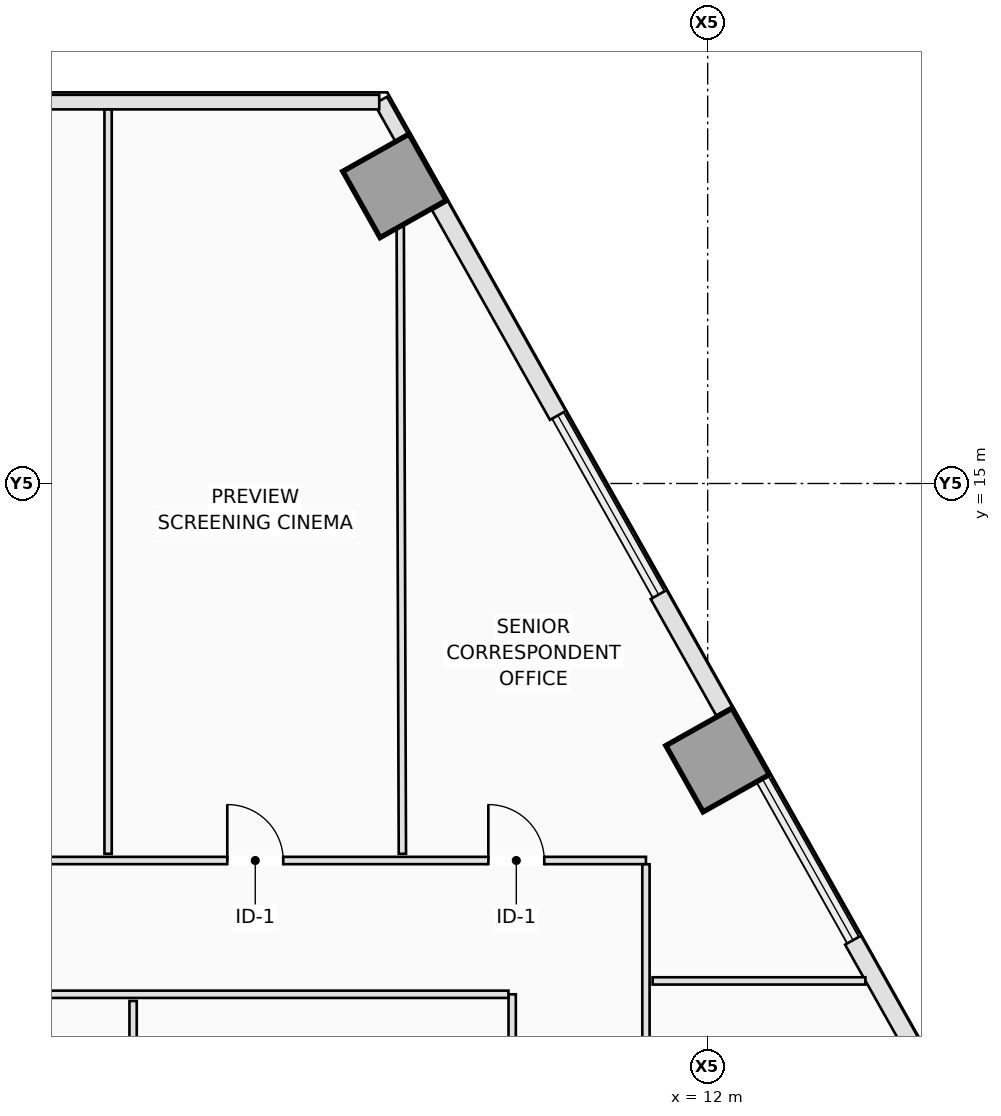
"""IFC4 building model, lengths in metres.
Left out: names, types, materials, properties, quantities, classifications, styles, units other than length and angle.
Written with IfcOpenShell. Run it as: python <this file> out.ifc"""

import sys

from ifc_helpers import new_model, si_unit, direction, frame, frame_2d, origin, origin_2d, place, context, subcontext, project, spatial, rectangle, extrude, element, fill, save


model = new_model("IFC4")
c1 = context("Model", 3, precision=1e-05, world=origin(), true_north=direction((0.0, 1.0)))
c2 = subcontext(c1, "Body", "Model", "MODEL_VIEW")
j1 = project(units=[si_unit("LENGTHUNIT", "METRE"), si_unit("PLANEANGLEUNIT", "RADIAN")], contexts=[c1])
p1 = place(None, origin())
s1 = spatial("IfcSite", under=j1, at=p1, CompositionType="ELEMENT")
p2 = place(p1, origin())
s2 = spatial("IfcBuilding", under=s1, at=p2, CompositionType="ELEMENT")
p3 = place(p2, frame((0.0, 0.0, 52.1)))
s3 = spatial("IfcBuildingStorey", under=s2, at=p3, CompositionType="ELEMENT", Elevation=52.1)
for number, where, z_axis, x_axis in (
    (1, (12.163, 10.451, 0.0), (0.0, 0.0, 1.0), (0.872, 0.49, 0.0)),
    (2, (6.851, 19.895, 0.0), (0.0, 0.0, 1.0), (0.872, 0.49, 0.0)),
):
    element("IfcColumn", number, at=place(p3, frame(where, z_axis=z_axis, x_axis=x_axis)), inside=s3, PredefinedType="COLUMN", context=c2, shape_type="SweptSolid", body=[
        extrude(rectangle(XDim=1.25, YDim=1.25, at=origin_2d()), origin(), (0.0, 0.0, 1.0), 3.5),
    ])
p4 = place(p3, frame((6.622, 21.301, 0.0), z_axis=(0.0, 0.0, 1.0), x_axis=(0.490261239633, -0.871575537125, 0.0)))
e3 = element("IfcWall", 3, at=p4, inside=s3, PredefinedType="STANDARD", context=c2, shape_type="SweptSolid", body=[
    extrude(rectangle(XDim=0.708, YDim=0.24, at=frame_2d((0.354, 0.0))), origin(), (0.0, 0.0, 1.0), 3.25),
])
p5 = place(p3, frame((7.597, 19.569, 0.0), z_axis=(0.0, 0.0, 1.0), x_axis=(0.490240735008, -0.871587070659, 0.0)))
e4 = element("IfcWall", 4, at=p5, inside=s3, PredefinedType="STANDARD", context=c2, shape_type="SweptSolid", body=[
    extrude(rectangle(XDim=3.957, YDim=0.3, at=frame_2d((1.979, 0.0))), origin(), (0.0, 0.0, 1.0), 3.25),
])
p6 = place(p3, frame((11.194, 13.173, 0.0), z_axis=(0.0, 0.0, 1.0), x_axis=(0.490324540864, -0.871539927156, 0.0)))
e5 = element("IfcWall", 5, at=p6, inside=s3, PredefinedType="STANDARD", context=c2, shape_type="SweptSolid", body=[
    extrude(rectangle(XDim=2.197, YDim=0.3, at=frame_2d((1.099, 0.0))), origin(), (0.0, 0.0, 1.0), 3.25),
])
p7 = place(p3, frame((14.391, 7.49, 0.0), z_axis=(0.0, 0.0, 1.0), x_axis=(0.490290775148, -0.871558922738, 0.0)))
e6 = element("IfcWall", 6, at=p7, inside=s3, PredefinedType="STANDARD", context=c2, shape_type="SweptSolid", body=[
    extrude(rectangle(XDim=3.14, YDim=0.3, at=frame_2d((1.57, 0.0))), origin(), (0.0, 0.0, 1.0), 3.25),
])
p8 = place(p3, frame((6.598, 21.272, 0.0), z_axis=(0.0, 0.0, 1.0), x_axis=(-1.0, 0.0, 0.0)))
e7 = element("IfcWall", 7, at=p8, inside=s3, PredefinedType="STANDARD", context=c2, shape_type="SweptSolid", body=[
    extrude(rectangle(XDim=13.187, YDim=0.24, at=frame_2d((6.593, 0.0))), origin(), (0.0, 0.0, 1.0), 3.25),
])
p9 = place(p8, frame((5.693, 0.0, 0.9)))
e8 = element("IfcOpeningElement", 8, at=p9, cuts=e7, PredefinedType="OPENING", context=c2, shape_type="SweptSolid", body=[
    extrude(rectangle(XDim=1.8, YDim=2.1, at=frame_2d((0.9, 1.05))), frame((0.0, 0.13, 0.0), z_axis=(0.0, -1.0, 0.0), x_axis=(1.0, 0.0, 0.0)), (0.0, 0.0, 1.0), 0.26),
])
p10 = place(p3, frame((-10.653, 8.8, 0.0), z_axis=(0.0, 0.0, 1.0), x_axis=(1.0, 0.0, 0.0)))
e9 = element("IfcWall", 9, at=p10, inside=s3, PredefinedType="PARTITIONING", context=c2, shape_type="SweptSolid", body=[
    extrude(rectangle(XDim=21.638, YDim=0.12, at=frame_2d((10.819, 0.0))), origin(), (0.0, 0.0, 1.0), 3.25),
])
p11 = place(p10, frame((14.753, 0.0, 0.0)))
e10 = element("IfcOpeningElement", 10, at=p11, cuts=e9, PredefinedType="OPENING", context=c2, shape_type="SweptSolid", body=[
    extrude(rectangle(XDim=0.92, YDim=2.12, at=frame_2d((0.46, 1.06))), frame((0.0, 0.07, 0.0), z_axis=(0.0, -1.0, 0.0), x_axis=(1.0, 0.0, 0.0)), (0.0, 0.0, 1.0), 0.14),
])
p12 = place(p10, frame((7.253, 0.0, 0.0)))
e11 = element("IfcOpeningElement", 11, at=p12, cuts=e9, PredefinedType="OPENING", context=c2, shape_type="SweptSolid", body=[
    extrude(rectangle(XDim=0.92, YDim=2.12, at=frame_2d((0.46, 1.06))), frame((0.0, 0.07, 0.0), z_axis=(0.0, -1.0, 0.0), x_axis=(1.0, 0.0, 0.0)), (0.0, 0.0, 1.0), 0.14),
])
p13 = place(p10, frame((19.046, 0.0, 0.0)))
e12 = element("IfcOpeningElement", 12, at=p13, cuts=e9, PredefinedType="OPENING", context=c2, shape_type="SweptSolid", body=[
    extrude(rectangle(XDim=0.92, YDim=2.12, at=frame_2d((0.46, 1.06))), frame((0.0, 0.07, 0.0), z_axis=(0.0, -1.0, 0.0), x_axis=(1.0, 0.0, 0.0)), (0.0, 0.0, 1.0), 0.14),
])
p14 = place(p3, frame((10.985, 8.738, 0.0), z_axis=(0.0, 0.0, 1.0), x_axis=(0.0, -1.0, 0.0)))
e13 = element("IfcWall", 13, at=p14, inside=s3, PredefinedType="PARTITIONING", context=c2, shape_type="SweptSolid", body=[
    extrude(rectangle(XDim=11.138, YDim=0.12, at=frame_2d((5.569, 0.0))), origin(), (0.0, 0.0, 1.0), 3.25),
])
p15 = place(p14, frame((3.838, 0.0, 0.0)))
e14 = element("IfcOpeningElement", 14, at=p15, cuts=e13, PredefinedType="OPENING", context=c2, shape_type="SweptSolid", body=[
    extrude(rectangle(XDim=0.92, YDim=2.12, at=frame_2d((0.46, 1.06))), frame((0.0, 0.07, 0.0), z_axis=(0.0, -1.0, 0.0), x_axis=(1.0, 0.0, 0.0)), (0.0, 0.0, 1.0), 0.14),
])
p16 = place(p3, frame((8.785, -2.338, 0.0), z_axis=(0.0, 0.0, 1.0), x_axis=(0.0, 1.0, 0.0)))
e15 = element("IfcWall", 15, at=p16, inside=s3, PredefinedType="PARTITIONING", context=c2, shape_type="SweptSolid", body=[
    extrude(rectangle(XDim=8.938, YDim=0.12, at=frame_2d((4.469, 0.0))), origin(), (0.0, 0.0, 1.0), 3.25),
])
p17 = place(p16, frame((3.978, 0.0, 0.0)))
e16 = element("IfcOpeningElement", 16, at=p17, cuts=e15, PredefinedType="OPENING", context=c2, shape_type="SweptSolid", body=[
    extrude(rectangle(XDim=0.92, YDim=2.12, at=frame_2d((0.46, 1.06))), frame((0.0, 0.07, 0.0), z_axis=(0.0, -1.0, 0.0), x_axis=(1.0, 0.0, 0.0)), (0.0, 0.0, 1.0), 0.14),
])
p18 = place(p3, frame((8.723, 6.6, 0.0), z_axis=(0.0, 0.0, 1.0), x_axis=(-1.0, 0.0, 0.0)))
e17 = element("IfcWall", 17, at=p18, inside=s3, PredefinedType="PARTITIONING", context=c2, shape_type="SweptSolid", body=[
    extrude(rectangle(XDim=17.238, YDim=0.12, at=frame_2d((8.619, 0.0))), origin(), (0.0, 0.0, 1.0), 3.25),
])
p19 = place(p18, frame((11.116, 0.0, 0.0)))
e18 = element("IfcOpeningElement", 18, at=p19, cuts=e17, PredefinedType="OPENING", context=c2, shape_type="SweptSolid", body=[
    extrude(rectangle(XDim=0.92, YDim=2.12, at=frame_2d((0.46, 1.06))), frame((0.0, 0.07, 0.0), z_axis=(0.0, -1.0, 0.0), x_axis=(1.0, 0.0, 0.0)), (0.0, 0.0, 1.0), 0.14),
])
p20 = place(p3, frame((2.14, 8.91, 0.0), z_axis=(0.0, 0.0, 1.0), x_axis=(0.0, 1.0, 0.0)))
e19 = element("IfcWall", 19, at=p20, inside=s3, PredefinedType="PARTITIONING", context=c2, shape_type="SweptSolid", body=[
    extrude(rectangle(XDim=12.24, YDim=0.12, at=frame_2d((6.12, 0.0))), origin(), (0.0, 0.0, 1.0), 3.25),
])
p21 = place(p3, frame((6.944, 19.228, 0.0), z_axis=(0.0, 0.0, 1.0), x_axis=(0.003407296486, -0.999994195148, 0.0)))
e20 = element("IfcWall", 20, at=p21, inside=s3, PredefinedType="PARTITIONING", context=c2, shape_type="SweptSolid", body=[
    extrude(rectangle(XDim=10.318, YDim=0.12, at=frame_2d((5.159, 0.0))), origin(), (0.0, 0.0, 1.0), 3.25),
])
p22 = place(p3, frame((14.593, 6.82, 0.0), z_axis=(0.0, 0.0, 1.0), x_axis=(-1.0, 0.0, 0.0)))
e21 = element("IfcWall", 21, at=p22, inside=s3, PredefinedType="PARTITIONING", context=c2, shape_type="SweptSolid", body=[
    extrude(rectangle(XDim=3.498, YDim=0.12, at=frame_2d((1.749, 0.0))), origin(), (0.0, 0.0, 1.0), 3.25),
])
p23 = place(p3, frame((2.551, -2.29, 0.0), z_axis=(0.0, 0.0, 1.0), x_axis=(0.0, 1.0, 0.0)))
e22 = element("IfcWall", 22, at=p23, inside=s3, PredefinedType="PARTITIONING", context=c2, shape_type="SweptSolid", body=[
    extrude(rectangle(XDim=8.78, YDim=0.12, at=frame_2d((4.39, 0.0))), origin(), (0.0, 0.0, 1.0), 3.25),
])
p24 = place(p11, origin())
e23 = element("IfcDoor", 23, at=p24, inside=s3, OperationType="SINGLE_SWING_LEFT", PredefinedType="DOOR", context=c2, shape_type="SweptSolid", body=[
    extrude(rectangle(XDim=0.92, YDim=2.12, at=frame_2d((0.46, 1.06))), frame((0.0, 0.025, 0.0), z_axis=(0.0, -1.0, 0.0), x_axis=(1.0, 0.0, 0.0)), (0.0, 0.0, 1.0), 0.05),
])
fill(e10, e23)
p25 = place(p13, origin())
e24 = element("IfcDoor", 24, at=p25, inside=s3, OperationType="SINGLE_SWING_LEFT", PredefinedType="DOOR", context=c2, shape_type="SweptSolid", body=[
    extrude(rectangle(XDim=0.92, YDim=2.12, at=frame_2d((0.46, 1.06))), frame((0.0, 0.025, 0.0), z_axis=(0.0, -1.0, 0.0), x_axis=(1.0, 0.0, 0.0)), (0.0, 0.0, 1.0), 0.05),
])
fill(e12, e24)
save(model, sys.argv[1])
